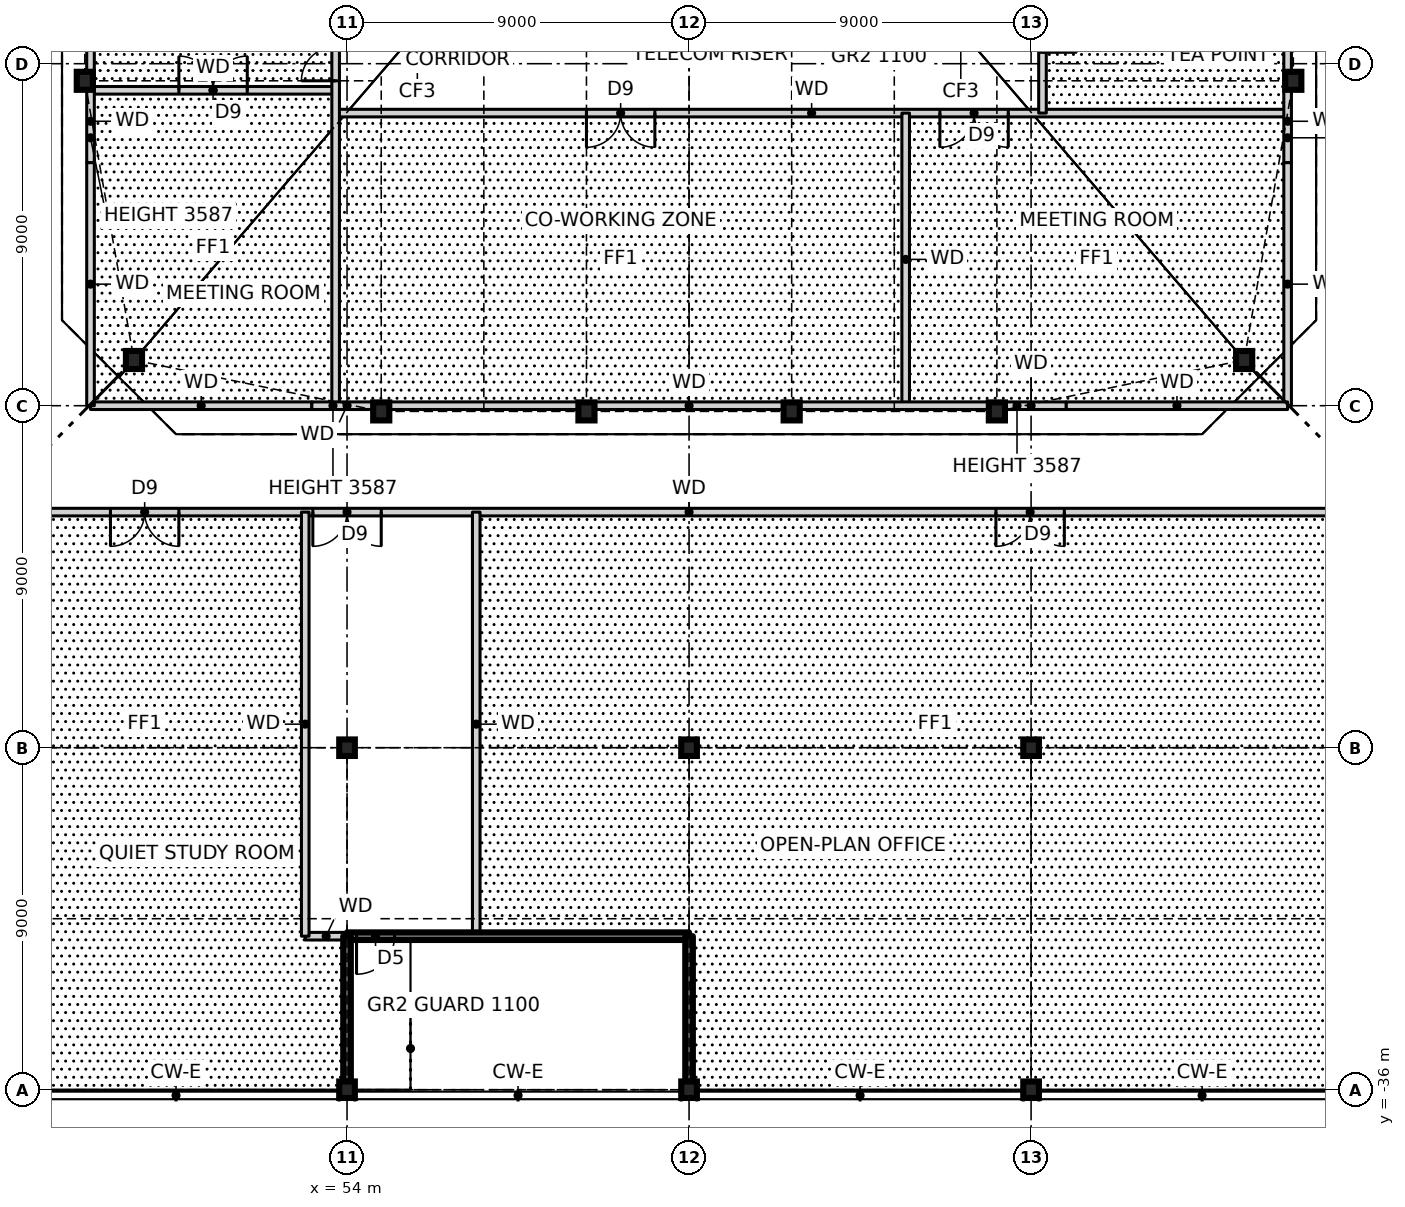
"""IFC4 building model, lengths in metres.
Left out: names, types, materials, properties, quantities, classifications, styles, units other than length and angle.
Written with IfcOpenShell. Run it as: python <this file> out.ifc"""

import sys

from ifc_helpers import new_model, si_unit, direction, frame, frame_2d, origin, origin_2d, place, context, subcontext, project, spatial, rectangle, i_section, extrude, element, fill, save


model = new_model("IFC4")
c1 = context("Model", 3, precision=1e-05, world=origin(), true_north=direction((0.0, 1.0)))
c2 = subcontext(c1, "Body", "Model", "MODEL_VIEW")
j1 = project(units=[si_unit("LENGTHUNIT", "METRE"), si_unit("PLANEANGLEUNIT", "RADIAN")], contexts=[c1])
p1 = place(None, origin())
s1 = spatial("IfcSite", under=j1, at=p1, CompositionType="ELEMENT")
p2 = place(p1, origin())
s2 = spatial("IfcBuilding", under=s1, at=p2, CompositionType="ELEMENT")
p3 = place(p2, frame((0.0, 0.0, 10.5)))
s3 = spatial("IfcBuildingStorey", under=s2, at=p3, CompositionType="ELEMENT", Elevation=10.5)
for number, where, z_axis, x_axis in (
    (1, (48.394, -16.797, 0.0), (0.0, 0.0, 1.0), (1.0, 0.0, 0.0)),
    (2, (54.9, -18.15, 0.0), (0.0, 0.0, 1.0), (1.0, 0.0, 0.0)),
    (3, (60.3, -18.15, 0.0), (0.0, 0.0, 1.0), (1.0, 0.0, 0.0)),
    (4, (65.7, -18.15, 0.0), (0.0, 0.0, 1.0), (1.0, 0.0, 0.0)),
    (5, (71.1, -18.15, 0.0), (0.0, 0.0, 1.0), (1.0, 0.0, 0.0)),
    (6, (77.606, -16.797, 0.0), (0.0, 0.0, 1.0), (1.0, 0.0, 0.0)),
    (7, (78.9, -9.45, 0.0), (0.0, 0.0, 1.0), (1.0, 0.0, 0.0)),
    (8, (47.1, -9.45, 0.0), (0.0, 0.0, 1.0), (1.0, 0.0, 0.0)),
):
    element("IfcColumn", number, at=place(p3, frame(where, z_axis=z_axis, x_axis=x_axis)), inside=s3, PredefinedType="COLUMN", context=c2, shape_type="SweptSolid", body=[
        extrude(i_section(OverallWidth=0.424, OverallDepth=0.475, WebThickness=0.048, FlangeThickness=0.077, at=origin_2d()), origin(), (0.0, 0.0, 1.0), 4.5),
    ])
for number, where, z_axis, x_axis in (
    (9, (54.0, -36.0, 0.0), (0.0, 0.0, 1.0), (1.0, 0.0, 0.0)),
    (10, (54.0, -27.0, 0.0), (0.0, 0.0, 1.0), (1.0, 0.0, 0.0)),
    (11, (63.0, -36.0, 0.0), (0.0, 0.0, 1.0), (1.0, 0.0, 0.0)),
    (12, (63.0, -27.0, 0.0), (0.0, 0.0, 1.0), (1.0, 0.0, 0.0)),
    (13, (72.0, -36.0, 0.0), (0.0, 0.0, 1.0), (1.0, 0.0, 0.0)),
    (14, (72.0, -27.0, 0.0), (0.0, 0.0, 1.0), (1.0, 0.0, 0.0)),
):
    element("IfcColumn", number, at=place(p3, frame(where, z_axis=z_axis, x_axis=x_axis)), inside=s3, PredefinedType="COLUMN", context=c2, shape_type="SweptSolid", body=[
        extrude(i_section(OverallWidth=0.411, OverallDepth=0.434, WebThickness=0.036, FlangeThickness=0.057, at=origin_2d()), origin(), (0.0, 0.0, 1.0), 4.5),
    ])
p4 = place(p3, frame((52.9, -31.96, 0.0), z_axis=(0.0, 0.0, 1.0), x_axis=(1.0, 0.0, 0.0)))
e15 = element("IfcWall", 15, at=p4, inside=s3, PredefinedType="SOLIDWALL", context=c2, shape_type="SweptSolid", body=[
    extrude(rectangle(XDim=1.1, YDim=0.2, at=frame_2d((0.55, 0.0))), origin(), (0.0, 0.0, 1.0), 4.25),
])
p5 = place(p3, frame((54.0, -31.96, 0.0), z_axis=(0.0, 0.0, 1.0), x_axis=(1.0, 0.0, 0.0)))
e16 = element("IfcWall", 16, at=p5, inside=s3, PredefinedType="SOLIDWALL", context=c2, shape_type="SweptSolid", body=[
    extrude(rectangle(XDim=9.0, YDim=0.2, at=frame_2d((4.5, 0.0))), origin(), (0.0, 0.0, 1.0), 4.5),
])
p6 = place(p5, frame((0.25, 0.0, 0.0)))
e17 = element("IfcOpeningElement", 17, at=p6, cuts=e16, PredefinedType="OPENING", context=c2, shape_type="SweptSolid", body=[
    extrude(rectangle(XDim=1.0, YDim=2.1, at=frame_2d((0.5, 1.05))), frame((0.0, 0.11, 0.0), z_axis=(0.0, -1.0, 0.0), x_axis=(1.0, 0.0, 0.0)), (0.0, 0.0, 1.0), 0.22),
])
p7 = place(p3, frame((44.45, -20.8, 0.0), z_axis=(0.0, 0.0, 1.0), x_axis=(1.0, 0.0, 0.0)))
e18 = element("IfcWall", 18, at=p7, inside=s3, PredefinedType="SOLIDWALL", context=c2, shape_type="SweptSolid", body=[
    extrude(rectangle(XDim=37.1, YDim=0.2, at=frame_2d((18.55, 0.0))), origin(), (0.0, 0.0, 1.0), 4.25),
])
p8 = place(p7, frame((3.325, 0.0, 0.0)))
e19 = element("IfcOpeningElement", 19, at=p8, cuts=e18, PredefinedType="OPENING", context=c2, shape_type="SweptSolid", body=[
    extrude(rectangle(XDim=1.8, YDim=2.1, at=frame_2d((0.9, 1.05))), frame((0.0, 0.11, 0.0), z_axis=(0.0, -1.0, 0.0), x_axis=(1.0, 0.0, 0.0)), (0.0, 0.0, 1.0), 0.22),
])
p9 = place(p7, frame((26.625, 0.0, 0.0)))
e20 = element("IfcOpeningElement", 20, at=p9, cuts=e18, PredefinedType="OPENING", context=c2, shape_type="SweptSolid", body=[
    extrude(rectangle(XDim=1.8, YDim=2.1, at=frame_2d((0.9, 1.05))), frame((0.0, 0.11, 0.0), z_axis=(0.0, -1.0, 0.0), x_axis=(1.0, 0.0, 0.0)), (0.0, 0.0, 1.0), 0.22),
])
p10 = place(p7, frame((8.65, 0.0, 0.0)))
e21 = element("IfcOpeningElement", 21, at=p10, cuts=e18, PredefinedType="OPENING", context=c2, shape_type="SweptSolid", body=[
    extrude(rectangle(XDim=1.8, YDim=2.1, at=frame_2d((0.9, 1.05))), frame((0.0, 0.11, 0.0), z_axis=(0.0, -1.0, 0.0), x_axis=(1.0, 0.0, 0.0)), (0.0, 0.0, 1.0), 0.22),
])
p11 = place(p3, frame((47.25, -18.0, 0.0), z_axis=(0.0, 0.0, 1.0), x_axis=(1.0, 0.0, 0.0)))
e22 = element("IfcWall", 22, at=p11, inside=s3, PredefinedType="SOLIDWALL", context=c2, shape_type="SweptSolid", body=[
    extrude(rectangle(XDim=5.824, YDim=0.2, at=frame_2d((2.912, 0.0))), origin(), (0.0, 0.0, 1.0), 4.25),
])
p12 = place(p3, frame((53.7, -10.3, 0.0), z_axis=(0.0, 0.0, 1.0), x_axis=(1.0, 0.0, 0.0)))
e23 = element("IfcWall", 23, at=p12, inside=s3, PredefinedType="SOLIDWALL", context=c2, shape_type="SweptSolid", body=[
    extrude(rectangle(XDim=25.05, YDim=0.2, at=frame_2d((12.525, 0.0))), origin(), (0.0, 0.0, 1.0), 4.25),
])
p13 = place(p12, frame((6.6, 0.0, 0.0)))
e24 = element("IfcOpeningElement", 24, at=p13, cuts=e23, PredefinedType="OPENING", context=c2, shape_type="SweptSolid", body=[
    extrude(rectangle(XDim=1.8, YDim=2.1, at=frame_2d((0.9, 1.05))), frame((0.0, 0.11, 0.0), z_axis=(0.0, -1.0, 0.0), x_axis=(1.0, 0.0, 0.0)), (0.0, 0.0, 1.0), 0.22),
])
p14 = place(p12, frame((15.9, 0.0, 0.0)))
e25 = element("IfcOpeningElement", 25, at=p14, cuts=e23, PredefinedType="OPENING", context=c2, shape_type="SweptSolid", body=[
    extrude(rectangle(XDim=1.8, YDim=2.1, at=frame_2d((0.9, 1.05))), frame((0.0, 0.11, 0.0), z_axis=(0.0, -1.0, 0.0), x_axis=(1.0, 0.0, 0.0)), (0.0, 0.0, 1.0), 0.22),
])
p15 = place(p3, frame((47.25, -9.7, 0.0), z_axis=(0.0, 0.0, 1.0), x_axis=(1.0, 0.0, 0.0)))
e26 = element("IfcWall", 26, at=p15, inside=s3, PredefinedType="SOLIDWALL", context=c2, shape_type="SweptSolid", body=[
    extrude(rectangle(XDim=6.45, YDim=0.2, at=frame_2d((3.225, 0.0))), origin(), (0.0, 0.0, 1.0), 4.25),
])
p16 = place(p15, frame((2.325, 0.0, 0.0)))
e27 = element("IfcOpeningElement", 27, at=p16, cuts=e26, PredefinedType="OPENING", context=c2, shape_type="SweptSolid", body=[
    extrude(rectangle(XDim=1.8, YDim=2.1, at=frame_2d((0.9, 1.05))), frame((0.0, 0.11, 0.0), z_axis=(0.0, -1.0, 0.0), x_axis=(1.0, 0.0, 0.0)), (0.0, 0.0, 1.0), 0.22),
])
p17 = place(p3, frame((78.75, -18.0, 0.0), z_axis=(0.0, 0.0, 1.0), x_axis=(0.0, 1.0, 0.0)))
e28 = element("IfcWall", 28, at=p17, inside=s3, PredefinedType="SOLIDWALL", context=c2, shape_type="SweptSolid", body=[
    extrude(rectangle(XDim=6.398, YDim=0.2, at=frame_2d((3.199, 0.0))), origin(), (0.0, 0.0, 1.0), 4.25),
])
p18 = place(p3, frame((72.3, -10.3, 0.0), z_axis=(0.0, 0.0, 1.0), x_axis=(0.0, 1.0, 0.0)))
e29 = element("IfcWall", 29, at=p18, inside=s3, PredefinedType="SOLIDWALL", context=c2, shape_type="SweptSolid", body=[
    extrude(rectangle(XDim=28.3, YDim=0.2, at=frame_2d((14.15, 0.0))), origin(), (0.0, 0.0, 1.0), 4.25),
])
p19 = place(p18, frame((1.6, 0.0, 0.0)))
e30 = element("IfcOpeningElement", 30, at=p19, cuts=e29, PredefinedType="OPENING", context=c2, shape_type="SweptSolid", body=[
    extrude(rectangle(XDim=1.8, YDim=2.1, at=frame_2d((0.9, 1.05))), frame((0.0, 0.11, 0.0), z_axis=(0.0, -1.0, 0.0), x_axis=(1.0, 0.0, 0.0)), (0.0, 0.0, 1.0), 0.22),
])
p20 = place(p18, frame((6.35, 0.0, 0.0)))
e31 = element("IfcOpeningElement", 31, at=p20, cuts=e29, PredefinedType="OPENING", context=c2, shape_type="SweptSolid", body=[
    extrude(rectangle(XDim=0.9, YDim=2.1, at=frame_2d((0.45, 1.05))), frame((0.0, 0.11, 0.0), z_axis=(0.0, -1.0, 0.0), x_axis=(1.0, 0.0, 0.0)), (0.0, 0.0, 1.0), 0.22),
])
p21 = place(p18, frame((9.95, 0.0, 0.0)))
e32 = element("IfcOpeningElement", 32, at=p21, cuts=e29, PredefinedType="OPENING", context=c2, shape_type="SweptSolid", body=[
    extrude(rectangle(XDim=0.9, YDim=2.1, at=frame_2d((0.45, 1.05))), frame((0.0, 0.11, 0.0), z_axis=(0.0, -1.0, 0.0), x_axis=(1.0, 0.0, 0.0)), (0.0, 0.0, 1.0), 0.22),
])
p22 = place(p18, frame((12.95, 0.0, 0.0)))
e33 = element("IfcOpeningElement", 33, at=p22, cuts=e29, PredefinedType="OPENING", context=c2, shape_type="SweptSolid", body=[
    extrude(rectangle(XDim=0.9, YDim=2.1, at=frame_2d((0.45, 1.05))), frame((0.0, 0.11, 0.0), z_axis=(0.0, -1.0, 0.0), x_axis=(1.0, 0.0, 0.0)), (0.0, 0.0, 1.0), 0.22),
])
p23 = place(p18, frame((16.7, 0.0, 0.0)))
e34 = element("IfcOpeningElement", 34, at=p23, cuts=e29, PredefinedType="OPENING", context=c2, shape_type="SweptSolid", body=[
    extrude(rectangle(XDim=1.8, YDim=2.1, at=frame_2d((0.9, 1.05))), frame((0.0, 0.11, 0.0), z_axis=(0.0, -1.0, 0.0), x_axis=(1.0, 0.0, 0.0)), (0.0, 0.0, 1.0), 0.22),
])
p24 = place(p3, frame((68.7, -18.0, 0.0), z_axis=(0.0, 0.0, 1.0), x_axis=(0.0, 1.0, 0.0)))
e35 = element("IfcWall", 35, at=p24, inside=s3, PredefinedType="SOLIDWALL", context=c2, shape_type="SweptSolid", body=[
    extrude(rectangle(XDim=7.7, YDim=0.2, at=frame_2d((3.85, 0.0))), origin(), (0.0, 0.0, 1.0), 4.25),
])
p25 = place(p3, frame((63.0, -35.783, 0.0), z_axis=(0.0, 0.0, 1.0), x_axis=(0.0, 1.0, 0.0)))
e36 = element("IfcWall", 36, at=p25, inside=s3, PredefinedType="SOLIDWALL", context=c2, shape_type="SweptSolid", body=[
    extrude(rectangle(XDim=3.823, YDim=0.2, at=frame_2d((1.911, 0.0))), origin(), (0.0, 0.0, 1.0), 4.5),
])
p26 = place(p3, frame((57.4, -31.96, 0.0), z_axis=(0.0, 0.0, 1.0), x_axis=(0.0, 1.0, 0.0)))
e37 = element("IfcWall", 37, at=p26, inside=s3, PredefinedType="SOLIDWALL", context=c2, shape_type="SweptSolid", body=[
    extrude(rectangle(XDim=11.16, YDim=0.2, at=frame_2d((5.58, 0.0))), origin(), (0.0, 0.0, 1.0), 4.25),
])
p27 = place(p3, frame((54.0, -35.783, 0.0), z_axis=(0.0, 0.0, 1.0), x_axis=(0.0, 1.0, 0.0)))
e38 = element("IfcWall", 38, at=p27, inside=s3, PredefinedType="SOLIDWALL", context=c2, shape_type="SweptSolid", body=[
    extrude(rectangle(XDim=3.823, YDim=0.2, at=frame_2d((1.911, 0.0))), origin(), (0.0, 0.0, 1.0), 4.5),
])
p28 = place(p3, frame((53.7, -18.0, 0.0), z_axis=(0.0, 0.0, 1.0), x_axis=(0.0, 1.0, 0.0)))
e39 = element("IfcWall", 39, at=p28, inside=s3, PredefinedType="SOLIDWALL", context=c2, shape_type="SweptSolid", body=[
    extrude(rectangle(XDim=28.3, YDim=0.2, at=frame_2d((14.15, 0.0))), origin(), (0.0, 0.0, 1.0), 4.25),
])
p29 = place(p28, frame((15.4, 0.0, 0.0)))
e40 = element("IfcOpeningElement", 40, at=p29, cuts=e39, PredefinedType="OPENING", context=c2, shape_type="SweptSolid", body=[
    extrude(rectangle(XDim=1.8, YDim=2.1, at=frame_2d((0.9, 1.05))), frame((0.0, 0.11, 0.0), z_axis=(0.0, -1.0, 0.0), x_axis=(1.0, 0.0, 0.0)), (0.0, 0.0, 1.0), 0.22),
])
p30 = place(p28, frame((25.4, 0.0, 0.0)))
e41 = element("IfcOpeningElement", 41, at=p30, cuts=e39, PredefinedType="OPENING", context=c2, shape_type="SweptSolid", body=[
    extrude(rectangle(XDim=1.8, YDim=2.1, at=frame_2d((0.9, 1.05))), frame((0.0, 0.11, 0.0), z_axis=(0.0, -1.0, 0.0), x_axis=(1.0, 0.0, 0.0)), (0.0, 0.0, 1.0), 0.22),
])
p31 = place(p28, frame((8.55, 0.0, 0.0)))
e42 = element("IfcOpeningElement", 42, at=p31, cuts=e39, PredefinedType="OPENING", context=c2, shape_type="SweptSolid", body=[
    extrude(rectangle(XDim=1.8, YDim=2.1, at=frame_2d((0.9, 1.05))), frame((0.0, 0.11, 0.0), z_axis=(0.0, -1.0, 0.0), x_axis=(1.0, 0.0, 0.0)), (0.0, 0.0, 1.0), 0.22),
])
p32 = place(p3, frame((52.9, -31.96, 0.0), z_axis=(0.0, 0.0, 1.0), x_axis=(0.0, 1.0, 0.0)))
e43 = element("IfcWall", 43, at=p32, inside=s3, PredefinedType="SOLIDWALL", context=c2, shape_type="SweptSolid", body=[
    extrude(rectangle(XDim=11.16, YDim=0.2, at=frame_2d((5.58, 0.0))), origin(), (0.0, 0.0, 1.0), 4.25),
])
p33 = place(p3, frame((47.25, -18.0, 0.0), z_axis=(0.0, 0.0, 1.0), x_axis=(0.0, 1.0, 0.0)))
e44 = element("IfcWall", 44, at=p33, inside=s3, PredefinedType="SOLIDWALL", context=c2, shape_type="SweptSolid", body=[
    extrude(rectangle(XDim=6.398, YDim=0.2, at=frame_2d((3.199, 0.0))), origin(), (0.0, 0.0, 1.0), 4.25),
])
p34 = place(p3, frame((53.074, -18.0, 0.0), z_axis=(0.0, 0.0, 1.0), x_axis=(1.0, 0.0, 0.0)))
e45 = element("IfcWall", 45, at=p34, inside=s3, PredefinedType="SOLIDWALL", context=c2, shape_type="SweptSolid", body=[
    extrude(rectangle(XDim=1.852, YDim=0.2, at=frame_2d((0.926, 0.0))), origin(), (0.0, 0.0, 1.0), 3.587),
])
p35 = place(p3, frame((54.926, -18.0, 0.0), z_axis=(0.0, 0.0, 1.0), x_axis=(1.0, 0.0, 0.0)))
e46 = element("IfcWall", 46, at=p35, inside=s3, PredefinedType="SOLIDWALL", context=c2, shape_type="SweptSolid", body=[
    extrude(rectangle(XDim=16.148, YDim=0.2, at=frame_2d((8.074, 0.0))), origin(), (0.0, 0.0, 1.0), 4.25),
])
p36 = place(p3, frame((71.074, -18.0, 0.0), z_axis=(0.0, 0.0, 1.0), x_axis=(1.0, 0.0, 0.0)))
e47 = element("IfcWall", 47, at=p36, inside=s3, PredefinedType="SOLIDWALL", context=c2, shape_type="SweptSolid", body=[
    extrude(rectangle(XDim=1.852, YDim=0.2, at=frame_2d((0.926, 0.0))), origin(), (0.0, 0.0, 1.0), 3.587),
])
p37 = place(p3, frame((72.926, -18.0, 0.0), z_axis=(0.0, 0.0, 1.0), x_axis=(1.0, 0.0, 0.0)))
e48 = element("IfcWall", 48, at=p37, inside=s3, PredefinedType="SOLIDWALL", context=c2, shape_type="SweptSolid", body=[
    extrude(rectangle(XDim=5.824, YDim=0.2, at=frame_2d((2.912, 0.0))), origin(), (0.0, 0.0, 1.0), 4.25),
])
p38 = place(p3, frame((78.75, -11.602, 0.0), z_axis=(0.0, 0.0, 1.0), x_axis=(0.0, 1.0, 0.0)))
e49 = element("IfcWall", 49, at=p38, inside=s3, PredefinedType="SOLIDWALL", context=c2, shape_type="SweptSolid", body=[
    extrude(rectangle(XDim=2.174, YDim=0.2, at=frame_2d((1.087, 0.0))), origin(), (0.0, 0.0, 1.0), 3.587),
])
p39 = place(p3, frame((78.75, -9.428, 0.0), z_axis=(0.0, 0.0, 1.0), x_axis=(0.0, 1.0, 0.0)))
e50 = element("IfcWall", 50, at=p39, inside=s3, PredefinedType="SOLIDWALL", context=c2, shape_type="SweptSolid", body=[
    extrude(rectangle(XDim=18.856, YDim=0.2, at=frame_2d((9.428, 0.0))), origin(), (0.0, 0.0, 1.0), 4.25),
])
p40 = place(p3, frame((47.25, -11.602, 0.0), z_axis=(0.0, 0.0, 1.0), x_axis=(0.0, 1.0, 0.0)))
e51 = element("IfcWall", 51, at=p40, inside=s3, PredefinedType="SOLIDWALL", context=c2, shape_type="SweptSolid", body=[
    extrude(rectangle(XDim=2.174, YDim=0.2, at=frame_2d((1.087, 0.0))), origin(), (0.0, 0.0, 1.0), 3.587),
])
p41 = place(p3, frame((47.25, -9.428, 0.0), z_axis=(0.0, 0.0, 1.0), x_axis=(0.0, 1.0, 0.0)))
e52 = element("IfcWall", 52, at=p41, inside=s3, PredefinedType="SOLIDWALL", context=c2, shape_type="SweptSolid", body=[
    extrude(rectangle(XDim=18.856, YDim=0.2, at=frame_2d((9.428, 0.0))), origin(), (0.0, 0.0, 1.0), 4.25),
])
p42 = place(p13, frame((1.8, 0.0, 0.0), z_axis=(0.0, 0.0, 1.0), x_axis=(-1.0, 0.0, 0.0)))
e53 = element("IfcDoor", 53, at=p42, inside=s3, OperationType="DOUBLE_DOOR_SINGLE_SWING", PredefinedType="DOOR", context=c2, shape_type="SweptSolid", body=[
    extrude(rectangle(XDim=1.8, YDim=2.1, at=frame_2d((0.9, 1.05))), frame((0.0, 0.025, 0.0), z_axis=(0.0, -1.0, 0.0), x_axis=(1.0, 0.0, 0.0)), (0.0, 0.0, 1.0), 0.05),
])
fill(e24, e53)
p43 = place(p14, frame((1.8, 0.0, 0.0), z_axis=(0.0, 0.0, 1.0), x_axis=(-1.0, 0.0, 0.0)))
e54 = element("IfcDoor", 54, at=p43, inside=s3, OperationType="DOUBLE_DOOR_SINGLE_SWING", PredefinedType="DOOR", context=c2, shape_type="SweptSolid", body=[
    extrude(rectangle(XDim=1.8, YDim=2.1, at=frame_2d((0.9, 1.05))), frame((0.0, 0.025, 0.0), z_axis=(0.0, -1.0, 0.0), x_axis=(1.0, 0.0, 0.0)), (0.0, 0.0, 1.0), 0.05),
])
fill(e25, e54)
p44 = place(p31, origin())
e55 = element("IfcDoor", 55, at=p44, inside=s3, OperationType="DOUBLE_DOOR_SINGLE_SWING", PredefinedType="DOOR", context=c2, shape_type="SweptSolid", body=[
    extrude(rectangle(XDim=1.8, YDim=2.1, at=frame_2d((0.9, 1.05))), frame((0.0, 0.025, 0.0), z_axis=(0.0, -1.0, 0.0), x_axis=(1.0, 0.0, 0.0)), (0.0, 0.0, 1.0), 0.05),
])
fill(e42, e55)
p45 = place(p16, origin())
e56 = element("IfcDoor", 56, at=p45, inside=s3, OperationType="DOUBLE_DOOR_SINGLE_SWING", PredefinedType="DOOR", context=c2, shape_type="SweptSolid", body=[
    extrude(rectangle(XDim=1.8, YDim=2.1, at=frame_2d((0.9, 1.05))), frame((0.0, 0.025, 0.0), z_axis=(0.0, -1.0, 0.0), x_axis=(1.0, 0.0, 0.0)), (0.0, 0.0, 1.0), 0.05),
])
fill(e27, e56)
p46 = place(p8, frame((1.8, 0.0, 0.0), z_axis=(0.0, 0.0, 1.0), x_axis=(-1.0, 0.0, 0.0)))
e57 = element("IfcDoor", 57, at=p46, inside=s3, OperationType="DOUBLE_DOOR_SINGLE_SWING", PredefinedType="DOOR", context=c2, shape_type="SweptSolid", body=[
    extrude(rectangle(XDim=1.8, YDim=2.1, at=frame_2d((0.9, 1.05))), frame((0.0, 0.025, 0.0), z_axis=(0.0, -1.0, 0.0), x_axis=(1.0, 0.0, 0.0)), (0.0, 0.0, 1.0), 0.05),
])
fill(e19, e57)
p47 = place(p9, frame((1.8, 0.0, 0.0), z_axis=(0.0, 0.0, 1.0), x_axis=(-1.0, 0.0, 0.0)))
e58 = element("IfcDoor", 58, at=p47, inside=s3, OperationType="DOUBLE_DOOR_SINGLE_SWING", PredefinedType="DOOR", context=c2, shape_type="SweptSolid", body=[
    extrude(rectangle(XDim=1.8, YDim=2.1, at=frame_2d((0.9, 1.05))), frame((0.0, 0.025, 0.0), z_axis=(0.0, -1.0, 0.0), x_axis=(1.0, 0.0, 0.0)), (0.0, 0.0, 1.0), 0.05),
])
fill(e20, e58)
p48 = place(p10, frame((1.8, 0.0, 0.0), z_axis=(0.0, 0.0, 1.0), x_axis=(-1.0, 0.0, 0.0)))
e59 = element("IfcDoor", 59, at=p48, inside=s3, OperationType="DOUBLE_DOOR_SINGLE_SWING", PredefinedType="DOOR", context=c2, shape_type="SweptSolid", body=[
    extrude(rectangle(XDim=1.8, YDim=2.1, at=frame_2d((0.9, 1.05))), frame((0.0, 0.025, 0.0), z_axis=(0.0, -1.0, 0.0), x_axis=(1.0, 0.0, 0.0)), (0.0, 0.0, 1.0), 0.05),
])
fill(e21, e59)
p49 = place(p6, frame((1.0, 0.0, 0.0), z_axis=(0.0, 0.0, 1.0), x_axis=(-1.0, 0.0, 0.0)))
e60 = element("IfcDoor", 60, at=p49, inside=s3, OperationType="SINGLE_SWING_RIGHT", PredefinedType="DOOR", context=c2, shape_type="SweptSolid", body=[
    extrude(rectangle(XDim=1.0, YDim=2.1, at=frame_2d((0.5, 1.05))), frame((0.0, 0.025, 0.0), z_axis=(0.0, -1.0, 0.0), x_axis=(1.0, 0.0, 0.0)), (0.0, 0.0, 1.0), 0.05),
])
fill(e17, e60)
save(model, sys.argv[1])
